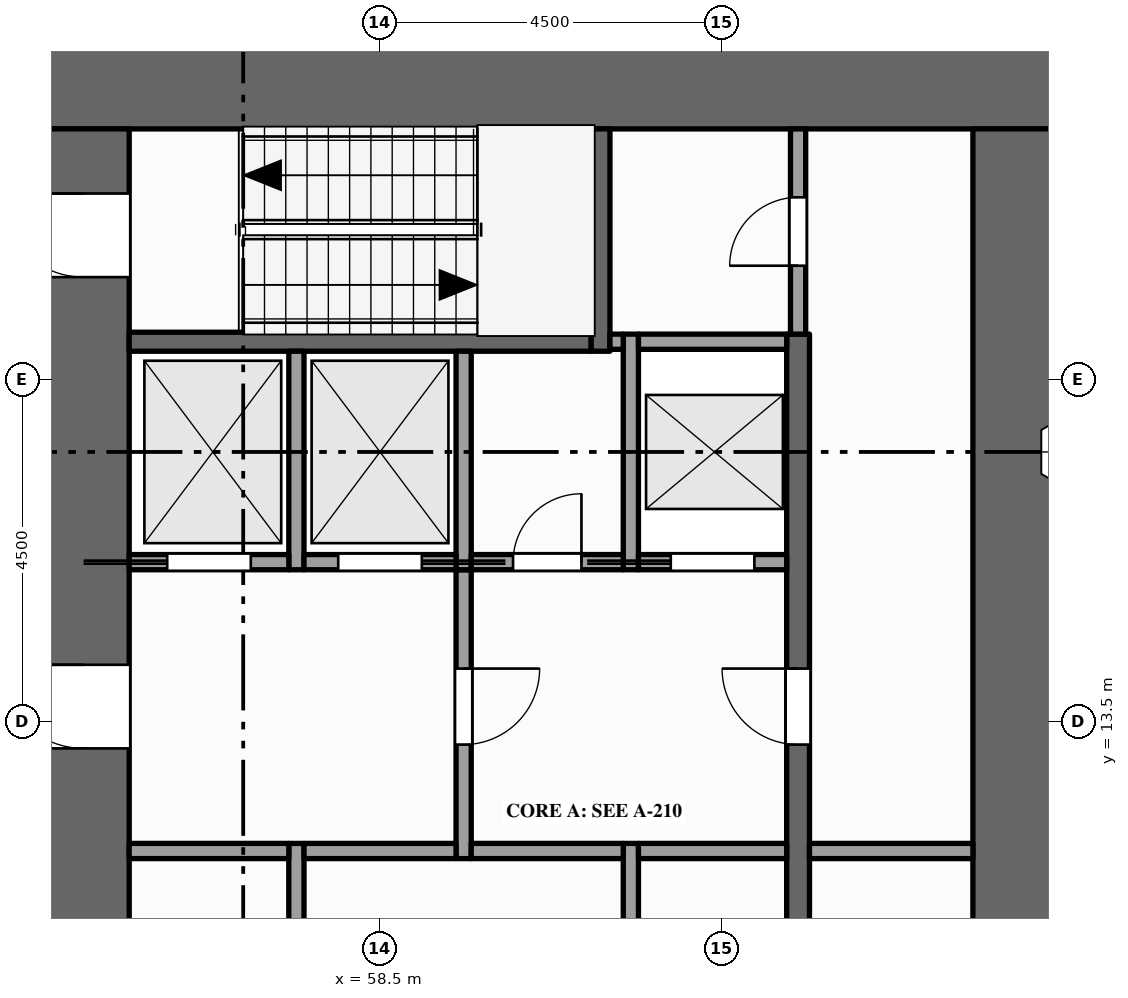
"""IFC4 building model, lengths in metres.
Left out: names, types, materials, properties, quantities, classifications, styles, units other than length and angle.
Written with IfcOpenShell. Run it as: python <this file> out.ifc"""

import sys

from ifc_helpers import new_model, si_unit, direction, frame, frame_2d, origin, place, context, subcontext, project, spatial, rectangle, extrude, element, fill, save


model = new_model("IFC4")
c1 = context("Model", 3, precision=1e-05, world=origin(), true_north=direction((0.0, 1.0)))
c2 = subcontext(c1, "Body", "Model", "MODEL_VIEW")
j1 = project(units=[si_unit("LENGTHUNIT", "METRE"), si_unit("PLANEANGLEUNIT", "RADIAN")], contexts=[c1])
p1 = place(None, origin())
s1 = spatial("IfcSite", under=j1, at=p1, CompositionType="ELEMENT")
p2 = place(p1, origin())
s2 = spatial("IfcBuilding", under=s1, at=p2, CompositionType="ELEMENT")
p3 = place(p2, frame((0.0, 0.0, 49.0)))
s3 = spatial("IfcBuildingStorey", under=s2, at=p3, CompositionType="ELEMENT", Elevation=49.0)
p4 = place(p3, frame((54.0, 21.9, -0.15), z_axis=(0.0, 0.0, 1.0), x_axis=(1.0, 0.0, 0.0)))
e1 = element("IfcWall", 1, at=p4, inside=s3, PredefinedType="SHEAR", context=c2, shape_type="SweptSolid", body=[
    extrude(rectangle(XDim=13.5, YDim=1.2, at=frame_2d((6.75, 0.0))), origin(), (0.0, 0.0, 1.0), 4.0),
])
p5 = place(p3, frame((54.6, 1.2, -0.15), z_axis=(0.0, 0.0, 1.0), x_axis=(0.0, 1.0, 0.0)))
e2 = element("IfcWall", 2, at=p5, inside=s3, PredefinedType="SHEAR", context=c2, shape_type="SweptSolid", body=[
    extrude(rectangle(XDim=20.1, YDim=1.2, at=frame_2d((10.05, 0.0))), origin(), (0.0, 0.0, 1.0), 4.0),
])
p6 = place(p5, frame((5.9, 0.0, 0.15)))
e3 = element("IfcOpeningElement", 3, at=p6, cuts=e2, PredefinedType="OPENING", context=c2, shape_type="SweptSolid", body=[
    extrude(rectangle(XDim=1.8, YDim=2.1, at=frame_2d((0.9, 1.05))), frame((0.0, 0.61, 0.0), z_axis=(0.0, -1.0, 0.0), x_axis=(1.0, 0.0, 0.0)), (0.0, 0.0, 1.0), 1.22),
])
p7 = place(p5, frame((11.95, 0.0, 0.15)))
e4 = element("IfcOpeningElement", 4, at=p7, cuts=e2, PredefinedType="OPENING", context=c2, shape_type="SweptSolid", body=[
    extrude(rectangle(XDim=1.1, YDim=2.1, at=frame_2d((0.55, 1.05))), frame((0.0, 0.61, 0.0), z_axis=(0.0, -1.0, 0.0), x_axis=(1.0, 0.0, 0.0)), (0.0, 0.0, 1.0), 1.22),
])
p8 = place(p5, frame((0.95, 0.0, 0.15)))
e5 = element("IfcOpeningElement", 5, at=p8, cuts=e2, PredefinedType="OPENING", context=c2, shape_type="SweptSolid", body=[
    extrude(rectangle(XDim=1.1, YDim=2.1, at=frame_2d((0.55, 1.05))), frame((0.0, 0.61, 0.0), z_axis=(0.0, -1.0, 0.0), x_axis=(1.0, 0.0, 0.0)), (0.0, 0.0, 1.0), 1.22),
])
p9 = place(p5, frame((18.15, 0.0, 0.15)))
e6 = element("IfcOpeningElement", 6, at=p9, cuts=e2, PredefinedType="OPENING", context=c2, shape_type="SweptSolid", body=[
    extrude(rectangle(XDim=1.1, YDim=2.1, at=frame_2d((0.55, 1.05))), frame((0.0, 0.61, 0.0), z_axis=(0.0, -1.0, 0.0), x_axis=(1.0, 0.0, 0.0)), (0.0, 0.0, 1.0), 1.22),
])
p10 = place(p3, frame((66.9, 1.2, -0.15), z_axis=(0.0, 0.0, 1.0), x_axis=(0.0, 1.0, 0.0)))
e7 = element("IfcWall", 7, at=p10, inside=s3, PredefinedType="SHEAR", context=c2, shape_type="SweptSolid", body=[
    extrude(rectangle(XDim=20.1, YDim=1.2, at=frame_2d((10.05, 0.0))), origin(), (0.0, 0.0, 1.0), 4.0),
])
p11 = place(p3, frame((57.4, 9.3, 0.0), z_axis=(0.0, 0.0, 1.0), x_axis=(0.0, 1.0, 0.0)))
e8 = element("IfcWall", 8, at=p11, inside=s3, PredefinedType="PARTITIONING", context=c2, shape_type="SweptSolid", body=[
    extrude(rectangle(XDim=2.6, YDim=0.2, at=frame_2d((1.3, 0.0))), origin(), (0.0, 0.0, 1.0), 3.85),
])
p12 = place(p3, frame((57.4, 15.5, 0.0), z_axis=(0.0, 0.0, 1.0), x_axis=(0.0, 1.0, 0.0)))
e9 = element("IfcWall", 9, at=p12, inside=s3, PredefinedType="SOLIDWALL", context=c2, shape_type="SweptSolid", body=[
    extrude(rectangle(XDim=2.875, YDim=0.2, at=frame_2d((1.438, 0.0))), origin(), (0.0, 0.0, 1.0), 3.85),
])
p13 = place(p3, frame((59.6, 11.7, 0.0), z_axis=(0.0, 0.0, 1.0), x_axis=(0.0, 1.0, 0.0)))
e10 = element("IfcWall", 10, at=p13, inside=s3, PredefinedType="PARTITIONING", context=c2, shape_type="SweptSolid", body=[
    extrude(rectangle(XDim=3.8, YDim=0.2, at=frame_2d((1.9, 0.0))), origin(), (0.0, 0.0, 1.0), 3.85),
])
p14 = place(p13, frame((1.5, 0.0, 0.0)))
e11 = element("IfcOpeningElement", 11, at=p14, cuts=e10, PredefinedType="OPENING", context=c2, shape_type="SweptSolid", body=[
    extrude(rectangle(XDim=1.0, YDim=2.1, at=frame_2d((0.5, 1.05))), frame((0.0, 0.11, 0.0), z_axis=(0.0, -1.0, 0.0), x_axis=(1.0, 0.0, 0.0)), (0.0, 0.0, 1.0), 0.22),
])
p15 = place(p3, frame((59.6, 15.5, 0.0), z_axis=(0.0, 0.0, 1.0), x_axis=(0.0, 1.0, 0.0)))
e12 = element("IfcWall", 12, at=p15, inside=s3, PredefinedType="SOLIDWALL", context=c2, shape_type="SweptSolid", body=[
    extrude(rectangle(XDim=2.875, YDim=0.2, at=frame_2d((1.438, 0.0))), origin(), (0.0, 0.0, 1.0), 3.85),
])
p16 = place(p3, frame((61.4, 18.375, 0.0), z_axis=(0.0, 0.0, 1.0), x_axis=(0.0, 1.0, 0.0)))
e13 = element("IfcWall", 13, at=p16, inside=s3, PredefinedType="SHEAR", context=c2, shape_type="SweptSolid", body=[
    extrude(rectangle(XDim=2.925, YDim=0.25, at=frame_2d((1.462, 0.0))), origin(), (0.0, 0.0, 1.0), 3.85),
])
p17 = place(p3, frame((61.8, 9.3, 0.0), z_axis=(0.0, 0.0, 1.0), x_axis=(0.0, 1.0, 0.0)))
e14 = element("IfcWall", 14, at=p17, inside=s3, PredefinedType="PARTITIONING", context=c2, shape_type="SweptSolid", body=[
    extrude(rectangle(XDim=2.6, YDim=0.2, at=frame_2d((1.3, 0.0))), origin(), (0.0, 0.0, 1.0), 3.85),
])
p18 = place(p3, frame((61.8, 15.5, 0.0), z_axis=(0.0, 0.0, 1.0), x_axis=(0.0, 1.0, 0.0)))
e15 = element("IfcWall", 15, at=p18, inside=s3, PredefinedType="SOLIDWALL", context=c2, shape_type="SweptSolid", body=[
    extrude(rectangle(XDim=3.1, YDim=0.2, at=frame_2d((1.55, 0.0))), origin(), (0.0, 0.0, 1.0), 3.85),
])
p19 = place(p3, frame((64.0, 4.1, 0.0), z_axis=(0.0, 0.0, 1.0), x_axis=(0.0, 1.0, 0.0)))
e16 = element("IfcWall", 16, at=p19, inside=s3, PredefinedType="SHEAR", context=c2, shape_type="SweptSolid", body=[
    extrude(rectangle(XDim=14.5, YDim=0.3, at=frame_2d((7.25, 0.0))), origin(), (0.0, 0.0, 1.0), 3.85),
])
p20 = place(p19, frame((3.4, 0.0, 0.0)))
e17 = element("IfcOpeningElement", 17, at=p20, cuts=e16, PredefinedType="OPENING", context=c2, shape_type="SweptSolid", body=[
    extrude(rectangle(XDim=1.0, YDim=2.1, at=frame_2d((0.5, 1.05))), frame((0.0, 0.16, 0.0), z_axis=(0.0, -1.0, 0.0), x_axis=(1.0, 0.0, 0.0)), (0.0, 0.0, 1.0), 0.32),
])
p21 = place(p19, frame((9.1, 0.0, 0.0)))
e18 = element("IfcOpeningElement", 18, at=p21, cuts=e16, PredefinedType="OPENING", context=c2, shape_type="SweptSolid", body=[
    extrude(rectangle(XDim=1.0, YDim=2.1, at=frame_2d((0.5, 1.05))), frame((0.0, 0.16, 0.0), z_axis=(0.0, -1.0, 0.0), x_axis=(1.0, 0.0, 0.0)), (0.0, 0.0, 1.0), 0.32),
])
p22 = place(p3, frame((64.0, 18.6, 0.0), z_axis=(0.0, 0.0, 1.0), x_axis=(0.0, 1.0, 0.0)))
e19 = element("IfcWall", 19, at=p22, inside=s3, PredefinedType="PARTITIONING", context=c2, shape_type="SweptSolid", body=[
    extrude(rectangle(XDim=2.7, YDim=0.2, at=frame_2d((1.35, 0.0))), origin(), (0.0, 0.0, 1.0), 3.85),
])
p23 = place(p22, frame((0.9, 0.0, 0.0)))
e20 = element("IfcOpeningElement", 20, at=p23, cuts=e19, PredefinedType="OPENING", context=c2, shape_type="SweptSolid", body=[
    extrude(rectangle(XDim=0.9, YDim=2.1, at=frame_2d((0.45, 1.05))), frame((0.0, 0.11, 0.0), z_axis=(0.0, -1.0, 0.0), x_axis=(1.0, 0.0, 0.0)), (0.0, 0.0, 1.0), 0.22),
])
p24 = place(p3, frame((55.2, 11.8, 0.0), z_axis=(0.0, 0.0, 1.0), x_axis=(1.0, 0.0, 0.0)))
e21 = element("IfcWall", 21, at=p24, inside=s3, PredefinedType="PARTITIONING", context=c2, shape_type="SweptSolid", body=[
    extrude(rectangle(XDim=2.1, YDim=0.2, at=frame_2d((1.05, 0.0))), origin(), (0.0, 0.0, 1.0), 3.85),
])
for number, where, z_axis, x_axis in (
    (22, (57.5, 11.8, 0.0), (0.0, 0.0, 1.0), (1.0, 0.0, 0.0)),
    (23, (59.7, 11.8, 0.0), (0.0, 0.0, 1.0), (1.0, 0.0, 0.0)),
):
    element("IfcWall", number, at=place(p3, frame(where, z_axis=z_axis, x_axis=x_axis)), inside=s3, PredefinedType="PARTITIONING", context=c2, shape_type="SweptSolid", body=[
        extrude(rectangle(XDim=2.0, YDim=0.2, at=frame_2d((1.0, 0.0))), origin(), (0.0, 0.0, 1.0), 3.85),
    ])
p25 = place(p3, frame((61.9, 11.8, 0.0), z_axis=(0.0, 0.0, 1.0), x_axis=(1.0, 0.0, 0.0)))
e24 = element("IfcWall", 24, at=p25, inside=s3, PredefinedType="PARTITIONING", context=c2, shape_type="SweptSolid", body=[
    extrude(rectangle(XDim=1.95, YDim=0.2, at=frame_2d((0.975, 0.0))), origin(), (0.0, 0.0, 1.0), 3.85),
])
p26 = place(p3, frame((64.15, 11.8, 0.0), z_axis=(0.0, 0.0, 1.0), x_axis=(1.0, 0.0, 0.0)))
e25 = element("IfcWall", 25, at=p26, inside=s3, PredefinedType="PARTITIONING", context=c2, shape_type="SweptSolid", body=[
    extrude(rectangle(XDim=2.15, YDim=0.2, at=frame_2d((1.075, 0.0))), origin(), (0.0, 0.0, 1.0), 3.85),
])
p27 = place(p3, frame((55.2, 15.6, 0.0), z_axis=(0.0, 0.0, 1.0), x_axis=(1.0, 0.0, 0.0)))
e26 = element("IfcWall", 26, at=p27, inside=s3, PredefinedType="SOLIDWALL", context=c2, shape_type="SweptSolid", body=[
    extrude(rectangle(XDim=2.1, YDim=0.2, at=frame_2d((1.05, 0.0))), origin(), (0.0, 0.0, 1.0), 3.85),
])
p28 = place(p27, frame((0.5, 0.0, 0.012)))
e27 = element("IfcOpeningElement", 27, at=p28, cuts=e26, PredefinedType="OPENING", context=c2, shape_type="SweptSolid", body=[
    extrude(rectangle(XDim=1.1, YDim=2.1, at=frame_2d((0.55, 1.05))), frame((0.0, 0.11, 0.0), z_axis=(0.0, -1.0, 0.0), x_axis=(1.0, 0.0, 0.0)), (0.0, 0.0, 1.0), 0.22),
])
p29 = place(p3, frame((57.5, 15.6, 0.0), z_axis=(0.0, 0.0, 1.0), x_axis=(1.0, 0.0, 0.0)))
e28 = element("IfcWall", 28, at=p29, inside=s3, PredefinedType="SOLIDWALL", context=c2, shape_type="SweptSolid", body=[
    extrude(rectangle(XDim=2.0, YDim=0.2, at=frame_2d((1.0, 0.0))), origin(), (0.0, 0.0, 1.0), 3.85),
])
p30 = place(p29, frame((0.45, 0.0, 0.012)))
e29 = element("IfcOpeningElement", 29, at=p30, cuts=e28, PredefinedType="OPENING", context=c2, shape_type="SweptSolid", body=[
    extrude(rectangle(XDim=1.1, YDim=2.1, at=frame_2d((0.55, 1.05))), frame((0.0, 0.11, 0.0), z_axis=(0.0, -1.0, 0.0), x_axis=(1.0, 0.0, 0.0)), (0.0, 0.0, 1.0), 0.22),
])
p31 = place(p3, frame((59.7, 15.6, 0.0), z_axis=(0.0, 0.0, 1.0), x_axis=(1.0, 0.0, 0.0)))
e30 = element("IfcWall", 30, at=p31, inside=s3, PredefinedType="PARTITIONING", context=c2, shape_type="SweptSolid", body=[
    extrude(rectangle(XDim=2.0, YDim=0.2, at=frame_2d((1.0, 0.0))), origin(), (0.0, 0.0, 1.0), 3.85),
])
p32 = place(p31, frame((0.55, 0.0, 0.0)))
e31 = element("IfcOpeningElement", 31, at=p32, cuts=e30, PredefinedType="OPENING", context=c2, shape_type="SweptSolid", body=[
    extrude(rectangle(XDim=0.9, YDim=2.1, at=frame_2d((0.45, 1.05))), frame((0.0, 0.11, 0.0), z_axis=(0.0, -1.0, 0.0), x_axis=(1.0, 0.0, 0.0)), (0.0, 0.0, 1.0), 0.22),
])
p33 = place(p3, frame((61.9, 15.6, 0.0), z_axis=(0.0, 0.0, 1.0), x_axis=(1.0, 0.0, 0.0)))
e32 = element("IfcWall", 32, at=p33, inside=s3, PredefinedType="SOLIDWALL", context=c2, shape_type="SweptSolid", body=[
    extrude(rectangle(XDim=1.95, YDim=0.2, at=frame_2d((0.975, 0.0))), origin(), (0.0, 0.0, 1.0), 3.85),
])
p34 = place(p33, frame((0.425, 0.0, 0.012)))
e33 = element("IfcOpeningElement", 33, at=p34, cuts=e32, PredefinedType="OPENING", context=c2, shape_type="SweptSolid", body=[
    extrude(rectangle(XDim=1.1, YDim=2.1, at=frame_2d((0.55, 1.05))), frame((0.0, 0.11, 0.0), z_axis=(0.0, -1.0, 0.0), x_axis=(1.0, 0.0, 0.0)), (0.0, 0.0, 1.0), 0.22),
])
p35 = place(p3, frame((55.2, 18.5, 0.0), z_axis=(0.0, 0.0, 1.0), x_axis=(1.0, 0.0, 0.0)))
e34 = element("IfcWall", 34, at=p35, inside=s3, PredefinedType="SHEAR", context=c2, shape_type="SweptSolid", body=[
    extrude(rectangle(XDim=6.075, YDim=0.25, at=frame_2d((3.038, 0.0))), origin(), (0.0, 0.0, 1.0), 3.85),
])
p36 = place(p3, frame((61.525, 18.5, 0.0), z_axis=(0.0, 0.0, 1.0), x_axis=(1.0, 0.0, 0.0)))
e35 = element("IfcWall", 35, at=p36, inside=s3, PredefinedType="PARTITIONING", context=c2, shape_type="SweptSolid", body=[
    extrude(rectangle(XDim=0.175, YDim=0.2, at=frame_2d((0.087, 0.0))), origin(), (0.0, 0.0, 1.0), 3.85),
])
p37 = place(p3, frame((61.9, 18.5, 0.0), z_axis=(0.0, 0.0, 1.0), x_axis=(1.0, 0.0, 0.0)))
e36 = element("IfcWall", 36, at=p37, inside=s3, PredefinedType="SOLIDWALL", context=c2, shape_type="SweptSolid", body=[
    extrude(rectangle(XDim=1.95, YDim=0.2, at=frame_2d((0.975, 0.0))), origin(), (0.0, 0.0, 1.0), 3.85),
])
p38 = place(p28, origin())
e37 = element("IfcDoor", 37, at=p38, inside=s3, OperationType="SLIDING_TO_LEFT", PredefinedType="DOOR", context=c2, shape_type="SweptSolid", body=[
    extrude(rectangle(XDim=1.1, YDim=2.1, at=frame_2d((0.55, 1.05))), frame((0.0, 0.025, 0.0), z_axis=(0.0, -1.0, 0.0), x_axis=(1.0, 0.0, 0.0)), (0.0, 0.0, 1.0), 0.05),
])
fill(e27, e37)
p39 = place(p30, origin())
e38 = element("IfcDoor", 38, at=p39, inside=s3, OperationType="SLIDING_TO_RIGHT", PredefinedType="DOOR", context=c2, shape_type="SweptSolid", body=[
    extrude(rectangle(XDim=1.1, YDim=2.1, at=frame_2d((0.55, 1.05))), frame((0.0, 0.025, 0.0), z_axis=(0.0, -1.0, 0.0), x_axis=(1.0, 0.0, 0.0)), (0.0, 0.0, 1.0), 0.05),
])
fill(e29, e38)
p40 = place(p34, origin())
e39 = element("IfcDoor", 39, at=p40, inside=s3, OperationType="SLIDING_TO_LEFT", PredefinedType="DOOR", context=c2, shape_type="SweptSolid", body=[
    extrude(rectangle(XDim=1.1, YDim=2.1, at=frame_2d((0.55, 1.05))), frame((0.0, 0.025, 0.0), z_axis=(0.0, -1.0, 0.0), x_axis=(1.0, 0.0, 0.0)), (0.0, 0.0, 1.0), 0.05),
])
fill(e33, e39)
p41 = place(p7, origin())
e40 = element("IfcDoor", 40, at=p41, inside=s3, OperationType="SINGLE_SWING_RIGHT", PredefinedType="DOOR", context=c2, shape_type="SweptSolid", body=[
    extrude(rectangle(XDim=1.1, YDim=2.1, at=frame_2d((0.55, 1.05))), frame((0.0, 0.025, 0.0), z_axis=(0.0, -1.0, 0.0), x_axis=(1.0, 0.0, 0.0)), (0.0, 0.0, 1.0), 0.05),
])
fill(e4, e40)
p42 = place(p14, origin())
e41 = element("IfcDoor", 41, at=p42, inside=s3, OperationType="SINGLE_SWING_RIGHT", PredefinedType="DOOR", context=c2, shape_type="SweptSolid", body=[
    extrude(rectangle(XDim=1.0, YDim=2.1, at=frame_2d((0.5, 1.05))), frame((0.0, 0.025, 0.0), z_axis=(0.0, -1.0, 0.0), x_axis=(1.0, 0.0, 0.0)), (0.0, 0.0, 1.0), 0.05),
])
fill(e11, e41)
p43 = place(p21, origin())
e42 = element("IfcDoor", 42, at=p43, inside=s3, OperationType="SINGLE_SWING_RIGHT", PredefinedType="DOOR", context=c2, shape_type="SweptSolid", body=[
    extrude(rectangle(XDim=1.0, YDim=2.1, at=frame_2d((0.5, 1.05))), frame((0.0, 0.025, 0.0), z_axis=(0.0, -1.0, 0.0), x_axis=(1.0, 0.0, 0.0)), (0.0, 0.0, 1.0), 0.05),
])
fill(e18, e42)
p44 = place(p9, origin())
e43 = element("IfcDoor", 43, at=p44, inside=s3, OperationType="SINGLE_SWING_RIGHT", PredefinedType="DOOR", context=c2, shape_type="SweptSolid", body=[
    extrude(rectangle(XDim=1.1, YDim=2.1, at=frame_2d((0.55, 1.05))), frame((0.0, 0.025, 0.0), z_axis=(0.0, -1.0, 0.0), x_axis=(1.0, 0.0, 0.0)), (0.0, 0.0, 1.0), 0.05),
])
fill(e6, e43)
p45 = place(p23, origin())
e44 = element("IfcDoor", 44, at=p45, inside=s3, OperationType="SINGLE_SWING_LEFT", PredefinedType="DOOR", context=c2, shape_type="SweptSolid", body=[
    extrude(rectangle(XDim=0.9, YDim=2.1, at=frame_2d((0.45, 1.05))), frame((0.0, 0.025, 0.0), z_axis=(0.0, -1.0, 0.0), x_axis=(1.0, 0.0, 0.0)), (0.0, 0.0, 1.0), 0.05),
])
fill(e20, e44)
p46 = place(p32, origin())
e45 = element("IfcDoor", 45, at=p46, inside=s3, OperationType="SINGLE_SWING_RIGHT", PredefinedType="DOOR", context=c2, shape_type="SweptSolid", body=[
    extrude(rectangle(XDim=0.9, YDim=2.1, at=frame_2d((0.45, 1.05))), frame((0.0, 0.025, 0.0), z_axis=(0.0, -1.0, 0.0), x_axis=(1.0, 0.0, 0.0)), (0.0, 0.0, 1.0), 0.05),
])
fill(e31, e45)
save(model, sys.argv[1])
